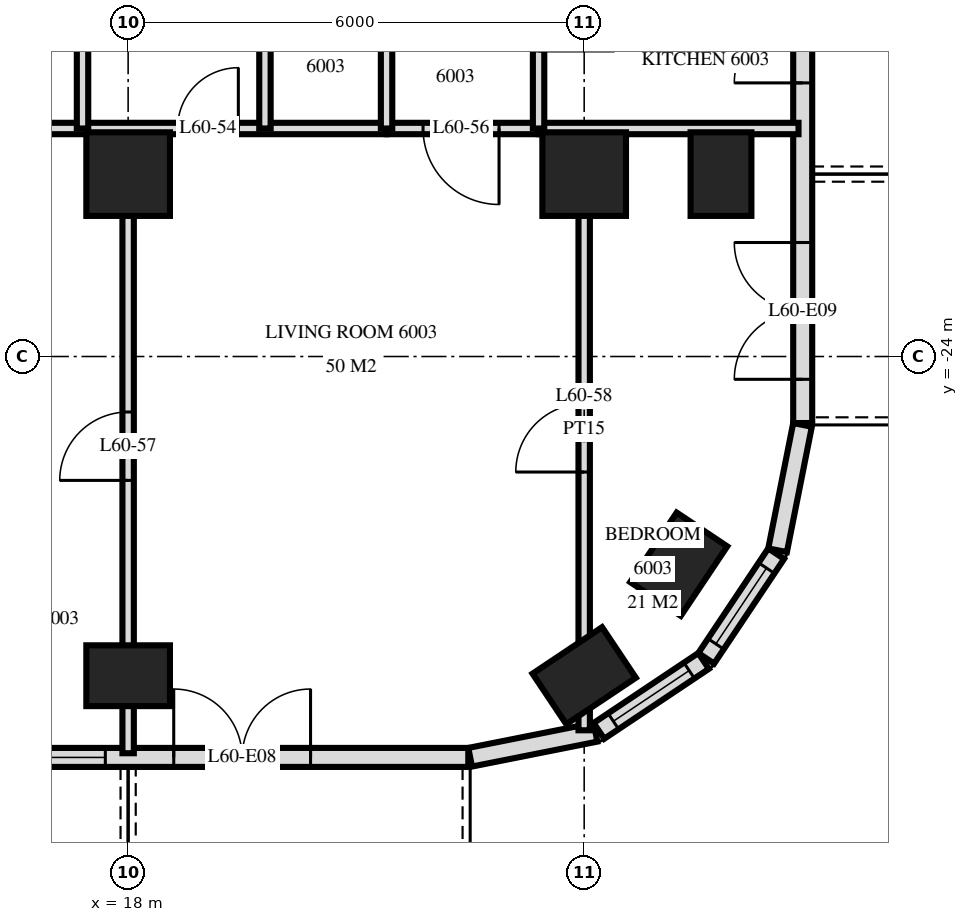
"""IFC4 building model, lengths in metres.
Left out: names, types, materials, properties, quantities, classifications, styles, units other than length and angle.
Written with IfcOpenShell. Run it as: python <this file> out.ifc"""

import sys

from ifc_helpers import new_model, si_unit, direction, frame, frame_2d, origin, origin_2d, place, context, subcontext, project, spatial, rectangle, extrude, element, fill, save


model = new_model("IFC4")
c1 = context("Model", 3, precision=1e-05, world=origin(), true_north=direction((0.0, 1.0)))
c2 = subcontext(c1, "Body", "Model", "MODEL_VIEW")
j1 = project(units=[si_unit("LENGTHUNIT", "METRE"), si_unit("PLANEANGLEUNIT", "RADIAN")], contexts=[c1])
p1 = place(None, origin())
s1 = spatial("IfcSite", under=j1, at=p1, CompositionType="ELEMENT")
p2 = place(p1, origin())
s2 = spatial("IfcBuilding", under=s1, at=p2, CompositionType="ELEMENT")
p3 = place(p2, frame((0.0, 0.0, 229.1)))
s3 = spatial("IfcBuildingStorey", under=s2, at=p3, CompositionType="ELEMENT", Elevation=229.1)
p4 = place(p3, frame((18.0, -28.2, 0.0), z_axis=(0.0, 0.0, 1.0), x_axis=(1.0, 0.0, 0.0)))
e1 = element("IfcColumn", 1, at=p4, inside=s3, PredefinedType="COLUMN", context=c2, shape_type="SweptSolid", body=[
    extrude(rectangle(XDim=1.1, YDim=0.8, at=origin_2d()), origin(), (0.0, 0.0, 1.0), 3.5),
])
p5 = place(p3, frame((18.0, -21.6, 0.0), z_axis=(0.0, 0.0, 1.0), x_axis=(1.0, 0.0, 0.0)))
e2 = element("IfcColumn", 2, at=p5, inside=s3, PredefinedType="COLUMN", context=c2, shape_type="SweptSolid", body=[
    extrude(rectangle(XDim=1.1, YDim=1.1, at=origin_2d()), origin(), (0.0, 0.0, 1.0), 3.5),
])
p6 = place(p3, frame((24.0, -28.2, 0.0), z_axis=(0.0, 0.0, 1.0), x_axis=(0.831459915646, 0.555584744817, 0.0)))
e3 = element("IfcColumn", 3, at=p6, inside=s3, PredefinedType="COLUMN", context=c2, shape_type="SweptSolid", body=[
    extrude(rectangle(XDim=1.1, YDim=0.8, at=origin_2d()), origin(), (0.0, 0.0, 1.0), 3.5),
])
p7 = place(p3, frame((24.0, -21.6, 0.0), z_axis=(0.0, 0.0, 1.0), x_axis=(1.0, 0.0, 0.0)))
e4 = element("IfcColumn", 4, at=p7, inside=s3, PredefinedType="COLUMN", context=c2, shape_type="SweptSolid", body=[
    extrude(rectangle(XDim=1.1, YDim=1.1, at=origin_2d()), origin(), (0.0, 0.0, 1.0), 3.5),
])
for number, where, z_axis, x_axis in (
    (5, (25.244, -26.733, 0.0), (0.0, 0.0, 1.0), (0.556, 0.831, 0.0)),
    (6, (25.8, -21.6, 0.0), (0.0, 0.0, 1.0), (0.0, 1.0, 0.0)),
):
    element("IfcColumn", number, at=place(p3, frame(where, z_axis=z_axis, x_axis=x_axis)), inside=s3, PredefinedType="COLUMN", context=c2, shape_type="SweptSolid", body=[
        extrude(rectangle(XDim=1.1, YDim=0.8, at=origin_2d()), origin(), (0.0, 0.0, 1.0), 3.5),
    ])
p8 = place(p3, frame((-22.475, -29.275, 0.0), z_axis=(0.0, 0.0, 1.0), x_axis=(1.0, 0.0, 0.0)))
e7 = element("IfcWall", 7, at=p8, inside=s3, PredefinedType="SOLIDWALL", context=c2, shape_type="SweptSolid", body=[
    extrude(rectangle(XDim=44.951, YDim=0.25, at=frame_2d((22.475, 0.0))), origin(), (0.0, 0.0, 1.0), 3.22),
])
p9 = place(p8, frame((0.575, 0.0, 0.0)))
e8 = element("IfcOpeningElement", 8, at=p9, cuts=e7, PredefinedType="OPENING", context=c2, shape_type="SweptSolid", body=[
    extrude(rectangle(XDim=1.8, YDim=2.4, at=frame_2d((0.9, 1.2))), frame((0.0, 0.135, 0.0), z_axis=(0.0, -1.0, 0.0), x_axis=(1.0, 0.0, 0.0)), (0.0, 0.0, 1.0), 0.27),
])
p10 = place(p8, frame((6.575, 0.0, 0.0)))
e9 = element("IfcOpeningElement", 9, at=p10, cuts=e7, PredefinedType="OPENING", context=c2, shape_type="SweptSolid", body=[
    extrude(rectangle(XDim=1.8, YDim=2.4, at=frame_2d((0.9, 1.2))), frame((0.0, 0.135, 0.0), z_axis=(0.0, -1.0, 0.0), x_axis=(1.0, 0.0, 0.0)), (0.0, 0.0, 1.0), 0.27),
])
p11 = place(p8, frame((11.075, 0.0, 0.0)))
e10 = element("IfcOpeningElement", 10, at=p11, cuts=e7, PredefinedType="OPENING", context=c2, shape_type="SweptSolid", body=[
    extrude(rectangle(XDim=1.8, YDim=2.4, at=frame_2d((0.9, 1.2))), frame((0.0, 0.135, 0.0), z_axis=(0.0, -1.0, 0.0), x_axis=(1.0, 0.0, 0.0)), (0.0, 0.0, 1.0), 0.27),
])
p12 = place(p8, frame((13.775, 0.0, 0.9)))
e11 = element("IfcOpeningElement", 11, at=p12, cuts=e7, PredefinedType="OPENING", context=c2, shape_type="SweptSolid", body=[
    extrude(rectangle(XDim=2.4, YDim=1.5, at=frame_2d((1.2, 0.75))), frame((0.0, 0.135, 0.0), z_axis=(0.0, -1.0, 0.0), x_axis=(1.0, 0.0, 0.0)), (0.0, 0.0, 1.0), 0.27),
])
p13 = place(p8, frame((16.775, 0.0, 0.9)))
e12 = element("IfcOpeningElement", 12, at=p13, cuts=e7, PredefinedType="OPENING", context=c2, shape_type="SweptSolid", body=[
    extrude(rectangle(XDim=2.4, YDim=1.5, at=frame_2d((1.2, 0.75))), frame((0.0, 0.135, 0.0), z_axis=(0.0, -1.0, 0.0), x_axis=(1.0, 0.0, 0.0)), (0.0, 0.0, 1.0), 0.27),
])
p14 = place(p8, frame((20.075, 0.0, 0.0)))
e13 = element("IfcOpeningElement", 13, at=p14, cuts=e7, PredefinedType="OPENING", context=c2, shape_type="SweptSolid", body=[
    extrude(rectangle(XDim=1.8, YDim=2.4, at=frame_2d((0.9, 1.2))), frame((0.0, 0.135, 0.0), z_axis=(0.0, -1.0, 0.0), x_axis=(1.0, 0.0, 0.0)), (0.0, 0.0, 1.0), 0.27),
])
p15 = place(p8, frame((23.075, 0.0, 0.0)))
e14 = element("IfcOpeningElement", 14, at=p15, cuts=e7, PredefinedType="OPENING", context=c2, shape_type="SweptSolid", body=[
    extrude(rectangle(XDim=1.8, YDim=2.4, at=frame_2d((0.9, 1.2))), frame((0.0, 0.135, 0.0), z_axis=(0.0, -1.0, 0.0), x_axis=(1.0, 0.0, 0.0)), (0.0, 0.0, 1.0), 0.27),
])
p16 = place(p8, frame((25.775, 0.0, 0.9)))
e15 = element("IfcOpeningElement", 15, at=p16, cuts=e7, PredefinedType="OPENING", context=c2, shape_type="SweptSolid", body=[
    extrude(rectangle(XDim=2.4, YDim=1.5, at=frame_2d((1.2, 0.75))), frame((0.0, 0.135, 0.0), z_axis=(0.0, -1.0, 0.0), x_axis=(1.0, 0.0, 0.0)), (0.0, 0.0, 1.0), 0.27),
])
p17 = place(p8, frame((29.075, 0.0, 0.0)))
e16 = element("IfcOpeningElement", 16, at=p17, cuts=e7, PredefinedType="OPENING", context=c2, shape_type="SweptSolid", body=[
    extrude(rectangle(XDim=1.8, YDim=2.4, at=frame_2d((0.9, 1.2))), frame((0.0, 0.135, 0.0), z_axis=(0.0, -1.0, 0.0), x_axis=(1.0, 0.0, 0.0)), (0.0, 0.0, 1.0), 0.27),
])
p18 = place(p8, frame((31.775, 0.0, 0.9)))
e17 = element("IfcOpeningElement", 17, at=p18, cuts=e7, PredefinedType="OPENING", context=c2, shape_type="SweptSolid", body=[
    extrude(rectangle(XDim=2.4, YDim=1.5, at=frame_2d((1.2, 0.75))), frame((0.0, 0.135, 0.0), z_axis=(0.0, -1.0, 0.0), x_axis=(1.0, 0.0, 0.0)), (0.0, 0.0, 1.0), 0.27),
])
p19 = place(p8, frame((35.075, 0.0, 0.0)))
e18 = element("IfcOpeningElement", 18, at=p19, cuts=e7, PredefinedType="OPENING", context=c2, shape_type="SweptSolid", body=[
    extrude(rectangle(XDim=1.8, YDim=2.4, at=frame_2d((0.9, 1.2))), frame((0.0, 0.135, 0.0), z_axis=(0.0, -1.0, 0.0), x_axis=(1.0, 0.0, 0.0)), (0.0, 0.0, 1.0), 0.27),
])
p20 = place(p8, frame((37.775, 0.0, 0.9)))
e19 = element("IfcOpeningElement", 19, at=p20, cuts=e7, PredefinedType="OPENING", context=c2, shape_type="SweptSolid", body=[
    extrude(rectangle(XDim=2.4, YDim=1.5, at=frame_2d((1.2, 0.75))), frame((0.0, 0.135, 0.0), z_axis=(0.0, -1.0, 0.0), x_axis=(1.0, 0.0, 0.0)), (0.0, 0.0, 1.0), 0.27),
])
p21 = place(p8, frame((41.075, 0.0, 0.0)))
e20 = element("IfcOpeningElement", 20, at=p21, cuts=e7, PredefinedType="OPENING", context=c2, shape_type="SweptSolid", body=[
    extrude(rectangle(XDim=1.8, YDim=2.4, at=frame_2d((0.9, 1.2))), frame((0.0, 0.135, 0.0), z_axis=(0.0, -1.0, 0.0), x_axis=(1.0, 0.0, 0.0)), (0.0, 0.0, 1.0), 0.27),
])
p22 = place(p3, frame((22.5, -29.273, 0.0), z_axis=(0.0, 0.0, 1.0), x_axis=(0.980775640221, 0.19513878023, 0.0)))
e21 = element("IfcWall", 21, at=p22, inside=s3, PredefinedType="SOLIDWALL", context=c2, shape_type="SweptSolid", body=[
    extrude(rectangle(XDim=1.681, YDim=0.25, at=frame_2d((0.841, 0.0))), origin(), (0.0, 0.0, 1.0), 3.22),
])
p23 = place(p3, frame((24.194, -28.926, 0.0), z_axis=(0.0, 0.0, 1.0), x_axis=(0.831482937015, 0.55555029066, 0.0)))
e22 = element("IfcWall", 22, at=p23, inside=s3, PredefinedType="SOLIDWALL", context=c2, shape_type="SweptSolid", body=[
    extrude(rectangle(XDim=1.656, YDim=0.25, at=frame_2d((0.828, 0.0))), origin(), (0.0, 0.0, 1.0), 3.22),
])
p24 = place(p23, frame((0.228, 0.0, 0.9)))
e23 = element("IfcOpeningElement", 23, at=p24, cuts=e22, PredefinedType="OPENING", context=c2, shape_type="SweptSolid", body=[
    extrude(rectangle(XDim=1.2, YDim=1.5, at=frame_2d((0.6, 0.75))), frame((0.0, 0.135, 0.0), z_axis=(0.0, -1.0, 0.0), x_axis=(1.0, 0.0, 0.0)), (0.0, 0.0, 1.0), 0.27),
])
p25 = place(p3, frame((25.606, -27.971, 0.0), z_axis=(0.0, 0.0, 1.0), x_axis=(0.55555029066, 0.831482937015, 0.0)))
e24 = element("IfcWall", 24, at=p25, inside=s3, PredefinedType="SOLIDWALL", context=c2, shape_type="SweptSolid", body=[
    extrude(rectangle(XDim=1.656, YDim=0.25, at=frame_2d((0.828, 0.0))), origin(), (0.0, 0.0, 1.0), 3.22),
])
p26 = place(p25, frame((0.228, 0.0, 0.9)))
e25 = element("IfcOpeningElement", 25, at=p26, cuts=e24, PredefinedType="OPENING", context=c2, shape_type="SweptSolid", body=[
    extrude(rectangle(XDim=1.2, YDim=1.5, at=frame_2d((0.6, 0.75))), frame((0.0, 0.135, 0.0), z_axis=(0.0, -1.0, 0.0), x_axis=(1.0, 0.0, 0.0)), (0.0, 0.0, 1.0), 0.27),
])
p27 = place(p3, frame((26.545, -26.549, 0.0), z_axis=(0.0, 0.0, 1.0), x_axis=(0.195026884138, 0.980797896849, 0.0)))
e26 = element("IfcWall", 26, at=p27, inside=s3, PredefinedType="SOLIDWALL", context=c2, shape_type="SweptSolid", body=[
    extrude(rectangle(XDim=1.681, YDim=0.25, at=frame_2d((0.841, 0.0))), origin(), (0.0, 0.0, 1.0), 3.22),
])
p28 = place(p3, frame((26.875, -24.875, 0.0), z_axis=(0.0, 0.0, 1.0), x_axis=(0.0, 1.0, 0.0)))
e27 = element("IfcWall", 27, at=p28, inside=s3, PredefinedType="SOLIDWALL", context=c2, shape_type="SweptSolid", body=[
    extrude(rectangle(XDim=21.551, YDim=0.25, at=frame_2d((10.775, 0.0))), origin(), (0.0, 0.0, 1.0), 3.22),
])
p29 = place(p28, frame((0.575, 0.0, 0.0)))
e28 = element("IfcOpeningElement", 28, at=p29, cuts=e27, PredefinedType="OPENING", context=c2, shape_type="SweptSolid", body=[
    extrude(rectangle(XDim=1.8, YDim=2.4, at=frame_2d((0.9, 1.2))), frame((0.0, 0.135, 0.0), z_axis=(0.0, -1.0, 0.0), x_axis=(1.0, 0.0, 0.0)), (0.0, 0.0, 1.0), 0.27),
])
p30 = place(p28, frame((4.475, 0.0, 0.0)))
e29 = element("IfcOpeningElement", 29, at=p30, cuts=e27, PredefinedType="OPENING", context=c2, shape_type="SweptSolid", body=[
    extrude(rectangle(XDim=1.8, YDim=2.4, at=frame_2d((0.9, 1.2))), frame((0.0, 0.135, 0.0), z_axis=(0.0, -1.0, 0.0), x_axis=(1.0, 0.0, 0.0)), (0.0, 0.0, 1.0), 0.27),
])
p31 = place(p28, frame((7.775, 0.0, 0.9)))
e30 = element("IfcOpeningElement", 30, at=p31, cuts=e27, PredefinedType="OPENING", context=c2, shape_type="SweptSolid", body=[
    extrude(rectangle(XDim=1.2, YDim=1.5, at=frame_2d((0.6, 0.75))), frame((0.0, 0.135, 0.0), z_axis=(0.0, -1.0, 0.0), x_axis=(1.0, 0.0, 0.0)), (0.0, 0.0, 1.0), 0.27),
])
p32 = place(p28, frame((13.1, 0.0, 0.0)))
e31 = element("IfcOpeningElement", 31, at=p32, cuts=e27, PredefinedType="OPENING", context=c2, shape_type="SweptSolid", body=[
    extrude(rectangle(XDim=1.8, YDim=2.4, at=frame_2d((0.9, 1.2))), frame((0.0, 0.135, 0.0), z_axis=(0.0, -1.0, 0.0), x_axis=(1.0, 0.0, 0.0)), (0.0, 0.0, 1.0), 0.27),
])
p33 = place(p3, frame((24.0, -28.918, 0.0), z_axis=(0.0, 0.0, 1.0), x_axis=(0.0, 1.0, 0.0)))
e32 = element("IfcWall", 32, at=p33, inside=s3, PredefinedType="PARTITIONING", context=c2, shape_type="SweptSolid", body=[
    extrude(rectangle(XDim=7.918, YDim=0.15, at=frame_2d((3.959, 0.0))), origin(), (0.0, 0.0, 1.0), 3.22),
])
p34 = place(p33, frame((3.398, 0.0, 0.0)))
e33 = element("IfcOpeningElement", 33, at=p34, cuts=e32, PredefinedType="OPENING", context=c2, shape_type="SweptSolid", body=[
    extrude(rectangle(XDim=0.9, YDim=2.1, at=frame_2d((0.45, 1.05))), frame((0.0, 0.085, 0.0), z_axis=(0.0, -1.0, 0.0), x_axis=(1.0, 0.0, 0.0)), (0.0, 0.0, 1.0), 0.17),
])
p35 = place(p3, frame((23.4, -21.0, 0.0), z_axis=(0.0, 0.0, 1.0), x_axis=(0.0, 1.0, 0.0)))
e34 = element("IfcWall", 34, at=p35, inside=s3, PredefinedType="PARTITIONING", context=c2, shape_type="SweptSolid", body=[
    extrude(rectangle(XDim=3.0, YDim=0.15, at=frame_2d((1.5, 0.0))), origin(), (0.0, 0.0, 1.0), 3.22),
])
p36 = place(p35, frame((1.02, 0.0, 0.0)))
e35 = element("IfcOpeningElement", 35, at=p36, cuts=e34, PredefinedType="OPENING", context=c2, shape_type="SweptSolid", body=[
    extrude(rectangle(XDim=1.0, YDim=2.1, at=frame_2d((0.5, 1.05))), frame((0.0, 0.085, 0.0), z_axis=(0.0, -1.0, 0.0), x_axis=(1.0, 0.0, 0.0)), (0.0, 0.0, 1.0), 0.17),
])
for number, where, z_axis, x_axis in (
    (36, (21.4, -21.0, 0.0), (0.0, 0.0, 1.0), (0.0, 1.0, 0.0)),
    (37, (19.8, -21.0, 0.0), (0.0, 0.0, 1.0), (0.0, 1.0, 0.0)),
):
    element("IfcWall", number, at=place(p3, frame(where, z_axis=z_axis, x_axis=x_axis)), inside=s3, PredefinedType="PARTITIONING", context=c2, shape_type="SweptSolid", body=[
        extrude(rectangle(XDim=3.0, YDim=0.15, at=frame_2d((1.5, 0.0))), origin(), (0.0, 0.0, 1.0), 3.22),
    ])
p37 = place(p3, frame((18.0, -29.22, 0.0), z_axis=(0.0, 0.0, 1.0), x_axis=(0.0, 1.0, 0.0)))
e38 = element("IfcWall", 38, at=p37, inside=s3, PredefinedType="PARTITIONING", context=c2, shape_type="SweptSolid", body=[
    extrude(rectangle(XDim=8.22, YDim=0.15, at=frame_2d((4.11, 0.0))), origin(), (0.0, 0.0, 1.0), 3.22),
])
p38 = place(p37, frame((3.59, 0.0, 0.0)))
e39 = element("IfcOpeningElement", 39, at=p38, cuts=e38, PredefinedType="OPENING", context=c2, shape_type="SweptSolid", body=[
    extrude(rectangle(XDim=0.9, YDim=2.1, at=frame_2d((0.45, 1.05))), frame((0.0, 0.085, 0.0), z_axis=(0.0, -1.0, 0.0), x_axis=(1.0, 0.0, 0.0)), (0.0, 0.0, 1.0), 0.17),
])
p39 = place(p3, frame((17.4, -21.0, 0.0), z_axis=(0.0, 0.0, 1.0), x_axis=(0.0, 1.0, 0.0)))
e40 = element("IfcWall", 40, at=p39, inside=s3, PredefinedType="PARTITIONING", context=c2, shape_type="SweptSolid", body=[
    extrude(rectangle(XDim=3.0, YDim=0.15, at=frame_2d((1.5, 0.0))), origin(), (0.0, 0.0, 1.0), 3.22),
])
p40 = place(p3, frame((21.4, -21.0, 0.0), z_axis=(0.0, 0.0, 1.0), x_axis=(1.0, 0.0, 0.0)))
e41 = element("IfcWall", 41, at=p40, inside=s3, PredefinedType="PARTITIONING", context=c2, shape_type="SweptSolid", body=[
    extrude(rectangle(XDim=2.0, YDim=0.15, at=frame_2d((1.0, 0.0))), origin(), (0.0, 0.0, 1.0), 3.22),
])
p41 = place(p40, frame((0.48, 0.0, 0.0)))
e42 = element("IfcOpeningElement", 42, at=p41, cuts=e41, PredefinedType="OPENING", context=c2, shape_type="SweptSolid", body=[
    extrude(rectangle(XDim=1.0, YDim=2.1, at=frame_2d((0.5, 1.05))), frame((0.0, 0.085, 0.0), z_axis=(0.0, -1.0, 0.0), x_axis=(1.0, 0.0, 0.0)), (0.0, 0.0, 1.0), 0.17),
])
p42 = place(p3, frame((13.3, -21.0, 0.0), z_axis=(0.0, 0.0, 1.0), x_axis=(1.0, 0.0, 0.0)))
e43 = element("IfcWall", 43, at=p42, inside=s3, PredefinedType="PARTITIONING", context=c2, shape_type="SweptSolid", body=[
    extrude(rectangle(XDim=8.1, YDim=0.15, at=frame_2d((4.05, 0.0))), origin(), (0.0, 0.0, 1.0), 3.22),
])
p43 = place(p42, frame((2.48, 0.0, 0.0)))
e44 = element("IfcOpeningElement", 44, at=p43, cuts=e43, PredefinedType="OPENING", context=c2, shape_type="SweptSolid", body=[
    extrude(rectangle(XDim=0.8, YDim=2.1, at=frame_2d((0.4, 1.05))), frame((0.0, 0.085, 0.0), z_axis=(0.0, -1.0, 0.0), x_axis=(1.0, 0.0, 0.0)), (0.0, 0.0, 1.0), 0.17),
])
p44 = place(p42, frame((5.35, 0.0, 0.0)))
e45 = element("IfcOpeningElement", 45, at=p44, cuts=e43, PredefinedType="OPENING", context=c2, shape_type="SweptSolid", body=[
    extrude(rectangle(XDim=0.8, YDim=2.1, at=frame_2d((0.4, 1.05))), frame((0.0, 0.085, 0.0), z_axis=(0.0, -1.0, 0.0), x_axis=(1.0, 0.0, 0.0)), (0.0, 0.0, 1.0), 0.17),
])
p45 = place(p3, frame((23.4, -21.0, 0.0), z_axis=(0.0, 0.0, 1.0), x_axis=(1.0, 0.0, 0.0)))
e46 = element("IfcWall", 46, at=p45, inside=s3, PredefinedType="PARTITIONING", context=c2, shape_type="SweptSolid", body=[
    extrude(rectangle(XDim=3.42, YDim=0.15, at=frame_2d((1.71, 0.0))), origin(), (0.0, 0.0, 1.0), 3.22),
])
p46 = place(p24, origin())
e47 = element("IfcWindow", 47, at=p46, inside=s3, PartitioningType="SINGLE_PANEL", PredefinedType="WINDOW", context=c2, shape_type="SweptSolid", body=[
    extrude(rectangle(XDim=1.2, YDim=1.5, at=frame_2d((0.6, 0.75))), frame((0.0, 0.03, 0.0), z_axis=(0.0, -1.0, 0.0), x_axis=(1.0, 0.0, 0.0)), (0.0, 0.0, 1.0), 0.06),
])
fill(e23, e47)
p47 = place(p26, origin())
e48 = element("IfcWindow", 48, at=p47, inside=s3, PartitioningType="SINGLE_PANEL", PredefinedType="WINDOW", context=c2, shape_type="SweptSolid", body=[
    extrude(rectangle(XDim=1.2, YDim=1.5, at=frame_2d((0.6, 0.75))), frame((0.0, 0.03, 0.0), z_axis=(0.0, -1.0, 0.0), x_axis=(1.0, 0.0, 0.0)), (0.0, 0.0, 1.0), 0.06),
])
fill(e25, e48)
p48 = place(p20, origin())
e49 = element("IfcWindow", 49, at=p48, inside=s3, PartitioningType="SINGLE_PANEL", PredefinedType="WINDOW", context=c2, shape_type="SweptSolid", body=[
    extrude(rectangle(XDim=2.4, YDim=1.5, at=frame_2d((1.2, 0.75))), frame((0.0, 0.03, 0.0), z_axis=(0.0, -1.0, 0.0), x_axis=(1.0, 0.0, 0.0)), (0.0, 0.0, 1.0), 0.06),
])
fill(e19, e49)
p49 = place(p21, origin())
e50 = element("IfcDoor", 50, at=p49, inside=s3, OperationType="DOUBLE_DOOR_SINGLE_SWING", PredefinedType="DOOR", context=c2, shape_type="SweptSolid", body=[
    extrude(rectangle(XDim=1.8, YDim=2.4, at=frame_2d((0.9, 1.2))), frame((0.0, 0.025, 0.0), z_axis=(0.0, -1.0, 0.0), x_axis=(1.0, 0.0, 0.0)), (0.0, 0.0, 1.0), 0.05),
])
fill(e20, e50)
p50 = place(p29, origin())
e51 = element("IfcDoor", 51, at=p50, inside=s3, OperationType="DOUBLE_DOOR_SINGLE_SWING", PredefinedType="DOOR", context=c2, shape_type="SweptSolid", body=[
    extrude(rectangle(XDim=1.8, YDim=2.4, at=frame_2d((0.9, 1.2))), frame((0.0, 0.025, 0.0), z_axis=(0.0, -1.0, 0.0), x_axis=(1.0, 0.0, 0.0)), (0.0, 0.0, 1.0), 0.05),
])
fill(e28, e51)
p51 = place(p30, origin())
e52 = element("IfcDoor", 52, at=p51, inside=s3, OperationType="DOUBLE_DOOR_SINGLE_SWING", PredefinedType="DOOR", context=c2, shape_type="SweptSolid", body=[
    extrude(rectangle(XDim=1.8, YDim=2.4, at=frame_2d((0.9, 1.2))), frame((0.0, 0.025, 0.0), z_axis=(0.0, -1.0, 0.0), x_axis=(1.0, 0.0, 0.0)), (0.0, 0.0, 1.0), 0.05),
])
fill(e29, e52)
p52 = place(p44, origin())
e53 = element("IfcDoor", 53, at=p52, inside=s3, OperationType="SINGLE_SWING_LEFT", PredefinedType="DOOR", context=c2, shape_type="SweptSolid", body=[
    extrude(rectangle(XDim=0.8, YDim=2.1, at=frame_2d((0.4, 1.05))), frame((0.0, 0.025, 0.0), z_axis=(0.0, -1.0, 0.0), x_axis=(1.0, 0.0, 0.0)), (0.0, 0.0, 1.0), 0.05),
])
fill(e45, e53)
p53 = place(p41, frame((0.5, 0.0, 0.0), z_axis=(0.0, 0.0, 1.0), x_axis=(-1.0, 0.0, 0.0)))
e54 = element("IfcDoor", 54, at=p53, inside=s3, OperationType="SINGLE_SWING_RIGHT", PredefinedType="DOOR", context=c2, shape_type="SweptSolid", body=[
    extrude(rectangle(XDim=1.0, YDim=2.1, at=frame_2d((0.0, 1.05))), frame((0.0, -0.025, 0.0), z_axis=(0.0, 1.0, 0.0), x_axis=(-1.0, 0.0, 0.0)), (0.0, 0.0, 1.0), 0.05),
])
fill(e42, e54)
p54 = place(p38, origin())
e55 = element("IfcDoor", 55, at=p54, inside=s3, OperationType="SINGLE_SWING_RIGHT", PredefinedType="DOOR", context=c2, shape_type="SweptSolid", body=[
    extrude(rectangle(XDim=0.9, YDim=2.1, at=frame_2d((0.45, 1.05))), frame((0.0, 0.025, 0.0), z_axis=(0.0, -1.0, 0.0), x_axis=(1.0, 0.0, 0.0)), (0.0, 0.0, 1.0), 0.05),
])
fill(e39, e55)
p55 = place(p34, origin())
e56 = element("IfcDoor", 56, at=p55, inside=s3, OperationType="SINGLE_SWING_RIGHT", PredefinedType="DOOR", context=c2, shape_type="SweptSolid", body=[
    extrude(rectangle(XDim=0.9, YDim=2.1, at=frame_2d((0.45, 1.05))), frame((0.0, 0.025, 0.0), z_axis=(0.0, -1.0, 0.0), x_axis=(1.0, 0.0, 0.0)), (0.0, 0.0, 1.0), 0.05),
])
fill(e33, e56)
save(model, sys.argv[1])
